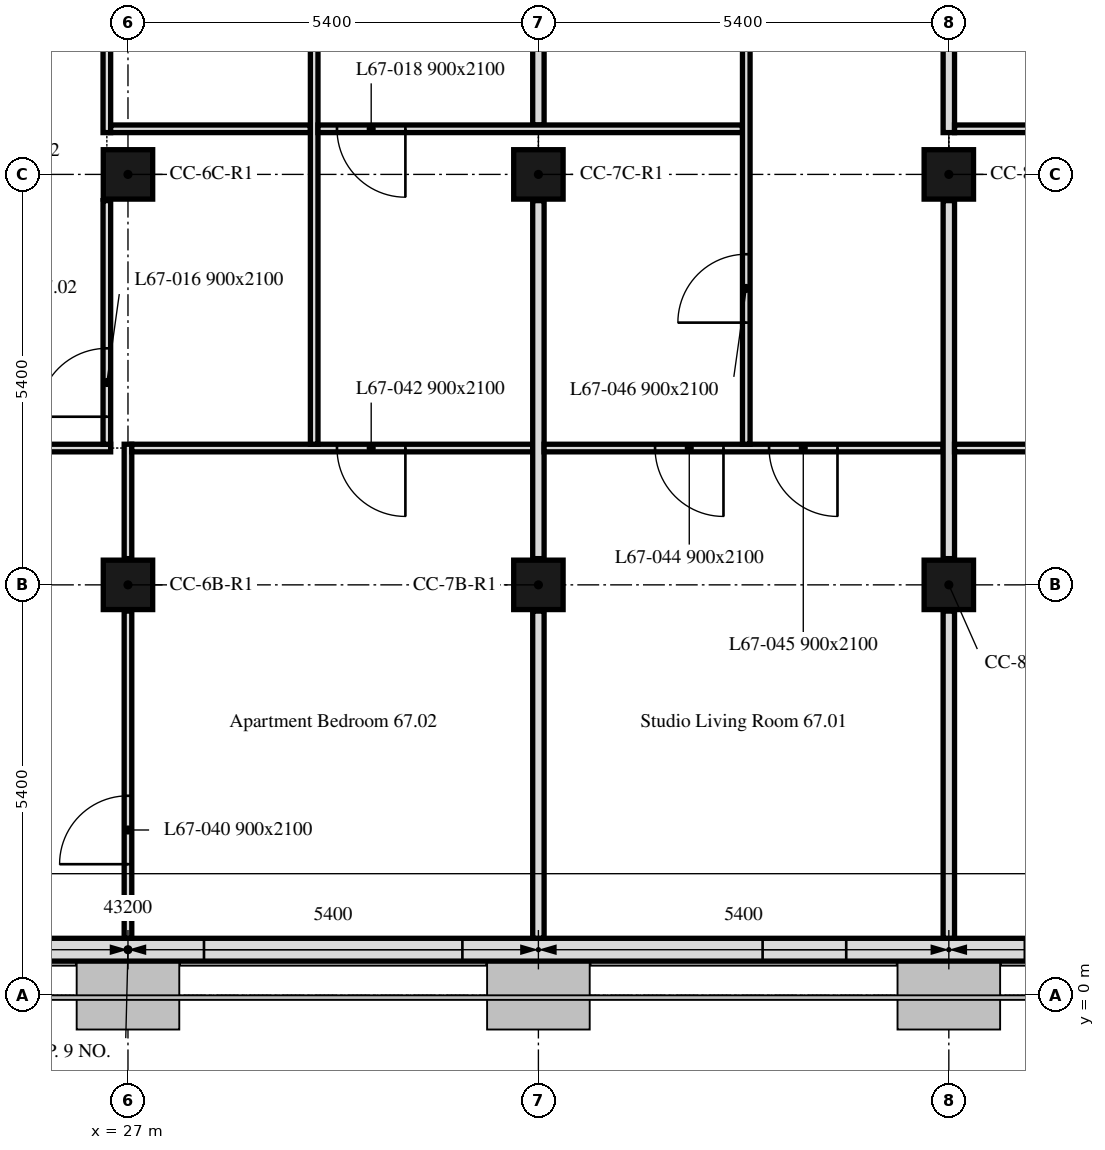
"""IFC4 building model, lengths in metres.
Left out: names, types, materials, properties, quantities, classifications, styles, units other than length and angle.
Written with IfcOpenShell. Run it as: python <this file> out.ifc"""

import sys

from ifc_helpers import new_model, si_unit, direction, frame, frame_2d, origin, origin_2d, place, context, subcontext, project, spatial, rectangle, extrude, element, fill, save


model = new_model("IFC4")
c1 = context("Model", 3, precision=1e-05, world=origin(), true_north=direction((0.0, 1.0)))
c2 = subcontext(c1, "Body", "Model", "MODEL_VIEW")
j1 = project(units=[si_unit("LENGTHUNIT", "METRE"), si_unit("PLANEANGLEUNIT", "RADIAN")], contexts=[c1])
p1 = place(None, origin())
s1 = spatial("IfcSite", under=j1, at=p1, CompositionType="ELEMENT")
p2 = place(p1, origin())
s2 = spatial("IfcBuilding", under=s1, at=p2, CompositionType="ELEMENT")
p3 = place(p2, frame((0.0, 0.0, 275.2)))
s3 = spatial("IfcBuildingStorey", under=s2, at=p3, CompositionType="ELEMENT", Elevation=275.2)
for number, where, z_axis, x_axis in (
    (1, (27.0, 5.4, 0.0), (0.0, 0.0, 1.0), (1.0, 0.0, 0.0)),
    (2, (32.4, 5.4, 0.0), (0.0, 0.0, 1.0), (1.0, 0.0, 0.0)),
    (3, (37.8, 5.4, 0.0), (0.0, 0.0, 1.0), (1.0, 0.0, 0.0)),
    (4, (27.0, 10.8, 0.0), (0.0, 0.0, 1.0), (1.0, 0.0, 0.0)),
    (5, (32.4, 10.8, 0.0), (0.0, 0.0, 1.0), (1.0, 0.0, 0.0)),
    (6, (37.8, 10.8, 0.0), (0.0, 0.0, 1.0), (1.0, 0.0, 0.0)),
):
    element("IfcColumn", number, at=place(p3, frame(where, z_axis=z_axis, x_axis=x_axis)), inside=s3, PredefinedType="COLUMN", context=c2, shape_type="SweptSolid", body=[
        extrude(rectangle(XDim=0.65, YDim=0.65, at=origin_2d()), origin(), (0.0, 0.0, 1.0), 3.0),
    ])
p4 = place(p3, frame((10.986, 0.6, 0.0), z_axis=(0.0, 0.0, 1.0), x_axis=(1.0, 0.0, 0.0)))
e7 = element("IfcWall", 7, at=p4, inside=s3, PredefinedType="SOLIDWALL", context=c2, shape_type="SweptSolid", body=[
    extrude(rectangle(XDim=32.027, YDim=0.3, at=frame_2d((16.014, 0.0))), origin(), (0.0, 0.0, 1.0), 3.0),
])
p5 = place(p4, frame((2.764, 0.0, 0.9)))
e8 = element("IfcOpeningElement", 8, at=p5, cuts=e7, PredefinedType="OPENING", context=c2, shape_type="SweptSolid", body=[
    extrude(rectangle(XDim=1.1, YDim=1.7, at=frame_2d((0.55, 0.85))), frame((0.0, 0.16, 0.0), z_axis=(0.0, -1.0, 0.0), x_axis=(1.0, 0.0, 0.0)), (0.0, 0.0, 1.0), 0.32),
])
p6 = place(p4, frame((6.214, 0.0, 0.9)))
e9 = element("IfcOpeningElement", 9, at=p6, cuts=e7, PredefinedType="OPENING", context=c2, shape_type="SweptSolid", body=[
    extrude(rectangle(XDim=3.4, YDim=1.7, at=frame_2d((1.7, 0.85))), frame((0.0, 0.16, 0.0), z_axis=(0.0, -1.0, 0.0), x_axis=(1.0, 0.0, 0.0)), (0.0, 0.0, 1.0), 0.32),
])
p7 = place(p4, frame((13.564, 0.0, 0.9)))
e10 = element("IfcOpeningElement", 10, at=p7, cuts=e7, PredefinedType="OPENING", context=c2, shape_type="SweptSolid", body=[
    extrude(rectangle(XDim=1.1, YDim=1.7, at=frame_2d((0.55, 0.85))), frame((0.0, 0.16, 0.0), z_axis=(0.0, -1.0, 0.0), x_axis=(1.0, 0.0, 0.0)), (0.0, 0.0, 1.0), 0.32),
])
p8 = place(p4, frame((17.014, 0.0, 0.9)))
e11 = element("IfcOpeningElement", 11, at=p8, cuts=e7, PredefinedType="OPENING", context=c2, shape_type="SweptSolid", body=[
    extrude(rectangle(XDim=3.4, YDim=1.7, at=frame_2d((1.7, 0.85))), frame((0.0, 0.16, 0.0), z_axis=(0.0, -1.0, 0.0), x_axis=(1.0, 0.0, 0.0)), (0.0, 0.0, 1.0), 0.32),
])
p9 = place(p4, frame((24.364, 0.0, 0.9)))
e12 = element("IfcOpeningElement", 12, at=p9, cuts=e7, PredefinedType="OPENING", context=c2, shape_type="SweptSolid", body=[
    extrude(rectangle(XDim=1.1, YDim=1.7, at=frame_2d((0.55, 0.85))), frame((0.0, 0.16, 0.0), z_axis=(0.0, -1.0, 0.0), x_axis=(1.0, 0.0, 0.0)), (0.0, 0.0, 1.0), 0.32),
])
p10 = place(p4, frame((27.814, 0.0, 0.9)))
e13 = element("IfcOpeningElement", 13, at=p10, cuts=e7, PredefinedType="OPENING", context=c2, shape_type="SweptSolid", body=[
    extrude(rectangle(XDim=3.4, YDim=1.7, at=frame_2d((1.7, 0.85))), frame((0.0, 0.16, 0.0), z_axis=(0.0, -1.0, 0.0), x_axis=(1.0, 0.0, 0.0)), (0.0, 0.0, 1.0), 0.32),
])
p11 = place(p3, frame((27.0, 0.751, 0.0), z_axis=(0.0, 0.0, 1.0), x_axis=(0.0, 1.0, 0.0)))
e14 = element("IfcWall", 14, at=p11, inside=s3, PredefinedType="PARTITIONING", context=c2, shape_type="SweptSolid", body=[
    extrude(rectangle(XDim=4.304, YDim=0.1, at=frame_2d((2.152, 0.0))), origin(), (0.0, 0.0, 1.0), 2.4),
])
p12 = place(p11, frame((0.974, 0.0, 0.0)))
e15 = element("IfcOpeningElement", 15, at=p12, cuts=e14, PredefinedType="OPENING", context=c2, shape_type="SweptSolid", body=[
    extrude(rectangle(XDim=0.9, YDim=2.1, at=frame_2d((0.45, 1.05))), frame((0.0, 0.05, 0.0), z_axis=(0.0, -1.0, 0.0), x_axis=(1.0, 0.0, 0.0)), (0.0, 0.0, 1.0), 0.1),
])
p13 = place(p3, frame((27.0, 5.745, 0.0), z_axis=(0.0, 0.0, 1.0), x_axis=(0.0, 1.0, 0.0)))
e16 = element("IfcWall", 16, at=p13, inside=s3, PredefinedType="PARTITIONING", context=c2, shape_type="SweptSolid", body=[
    extrude(rectangle(XDim=1.505, YDim=0.1, at=frame_2d((0.752, 0.0))), origin(), (0.0, 0.0, 1.0), 2.4),
])
p14 = place(p3, frame((26.772, 7.2, 0.0), z_axis=(0.0, 0.0, 1.0), x_axis=(-1.0, 0.0, 0.0)))
e17 = element("IfcWall", 17, at=p14, inside=s3, PredefinedType="PARTITIONING", context=c2, shape_type="SweptSolid", body=[
    extrude(rectangle(XDim=5.097, YDim=0.1, at=frame_2d((2.548, 0.0))), origin(), (0.0, 0.0, 1.0), 3.0),
])
p15 = place(p14, frame((3.801, 0.0, 0.0)))
e18 = element("IfcOpeningElement", 18, at=p15, cuts=e17, PredefinedType="OPENING", context=c2, shape_type="SweptSolid", body=[
    extrude(rectangle(XDim=0.9, YDim=2.1, at=frame_2d((0.45, 1.05))), frame((0.0, 0.05, 0.0), z_axis=(0.0, -1.0, 0.0), x_axis=(1.0, 0.0, 0.0)), (0.0, 0.0, 1.0), 0.1),
])
p16 = place(p14, frame((1.732, 0.0, 0.0)))
e19 = element("IfcOpeningElement", 19, at=p16, cuts=e17, PredefinedType="OPENING", context=c2, shape_type="SweptSolid", body=[
    extrude(rectangle(XDim=0.9, YDim=2.1, at=frame_2d((0.45, 1.05))), frame((0.0, 0.05, 0.0), z_axis=(0.0, -1.0, 0.0), x_axis=(1.0, 0.0, 0.0)), (0.0, 0.0, 1.0), 0.1),
])
p17 = place(p3, frame((32.4, 0.751, 0.0), z_axis=(0.0, 0.0, 1.0), x_axis=(0.0, 1.0, 0.0)))
e20 = element("IfcWall", 20, at=p17, inside=s3, PredefinedType="PARTITIONING", context=c2, shape_type="SweptSolid", body=[
    extrude(rectangle(XDim=4.304, YDim=0.15, at=frame_2d((2.152, 0.0))), origin(), (0.0, 0.0, 1.0), 2.4),
])
p18 = place(p3, frame((32.325, 7.2, 0.0), z_axis=(0.0, 0.0, 1.0), x_axis=(-1.0, 0.0, 0.0)))
e21 = element("IfcWall", 21, at=p18, inside=s3, PredefinedType="PARTITIONING", context=c2, shape_type="SweptSolid", body=[
    extrude(rectangle(XDim=5.275, YDim=0.1, at=frame_2d((2.637, 0.0))), origin(), (0.0, 0.0, 1.0), 3.0),
])
p19 = place(p18, frame((1.675, 0.0, 0.0)))
e22 = element("IfcOpeningElement", 22, at=p19, cuts=e21, PredefinedType="OPENING", context=c2, shape_type="SweptSolid", body=[
    extrude(rectangle(XDim=0.9, YDim=2.1, at=frame_2d((0.45, 1.05))), frame((0.0, 0.05, 0.0), z_axis=(0.0, -1.0, 0.0), x_axis=(1.0, 0.0, 0.0)), (0.0, 0.0, 1.0), 0.1),
])
p20 = place(p3, frame((26.722, 7.25, 0.0), z_axis=(0.0, 0.0, 1.0), x_axis=(0.0, 1.0, 0.0)))
e23 = element("IfcWall", 23, at=p20, inside=s3, PredefinedType="PARTITIONING", context=c2, shape_type="SweptSolid", body=[
    extrude(rectangle(XDim=3.205, YDim=0.1, at=frame_2d((1.603, 0.0))), origin(), (0.0, 0.0, 1.0), 3.0),
])
p21 = place(p20, frame((0.362, 0.0, 0.0)))
e24 = element("IfcOpeningElement", 24, at=p21, cuts=e23, PredefinedType="OPENING", context=c2, shape_type="SweptSolid", body=[
    extrude(rectangle(XDim=0.9, YDim=2.1, at=frame_2d((0.45, 1.05))), frame((0.0, 0.05, 0.0), z_axis=(0.0, -1.0, 0.0), x_axis=(1.0, 0.0, 0.0)), (0.0, 0.0, 1.0), 0.1),
])
p22 = place(p3, frame((26.722, 11.35, 0.0), z_axis=(0.0, 0.0, 1.0), x_axis=(0.0, 1.0, 0.0)))
e25 = element("IfcWall", 25, at=p22, inside=s3, PredefinedType="PARTITIONING", context=c2, shape_type="SweptSolid", body=[
    extrude(rectangle(XDim=2.975, YDim=0.1, at=frame_2d((1.487, 0.0))), origin(), (0.0, 0.0, 1.0), 3.0),
])
p23 = place(p22, frame((1.825, 0.0, 0.0)))
e26 = element("IfcOpeningElement", 26, at=p23, cuts=e25, PredefinedType="OPENING", context=c2, shape_type="SweptSolid", body=[
    extrude(rectangle(XDim=0.9, YDim=2.1, at=frame_2d((0.45, 1.05))), frame((0.0, 0.05, 0.0), z_axis=(0.0, -1.0, 0.0), x_axis=(1.0, 0.0, 0.0)), (0.0, 0.0, 1.0), 0.1),
])
p24 = place(p3, frame((29.4, 11.4, 0.0), z_axis=(0.0, 0.0, 1.0), x_axis=(-1.0, 0.0, 0.0)))
e27 = element("IfcWall", 27, at=p24, inside=s3, PredefinedType="PARTITIONING", context=c2, shape_type="SweptSolid", body=[
    extrude(rectangle(XDim=2.628, YDim=0.1, at=frame_2d((1.314, 0.0))), origin(), (0.0, 0.0, 1.0), 2.4),
])
p25 = place(p3, frame((29.45, 7.25, 0.0), z_axis=(0.0, 0.0, 1.0), x_axis=(0.0, 1.0, 0.0)))
e28 = element("IfcWall", 28, at=p25, inside=s3, PredefinedType="PARTITIONING", context=c2, shape_type="SweptSolid", body=[
    extrude(rectangle(XDim=7.075, YDim=0.1, at=frame_2d((3.538, 0.0))), origin(), (0.0, 0.0, 1.0), 3.0),
])
p26 = place(p3, frame((32.4, 5.745, 0.0), z_axis=(0.0, 0.0, 1.0), x_axis=(0.0, 1.0, 0.0)))
e29 = element("IfcWall", 29, at=p26, inside=s3, PredefinedType="PARTITIONING", context=c2, shape_type="SweptSolid", body=[
    extrude(rectangle(XDim=4.71, YDim=0.15, at=frame_2d((2.355, 0.0))), origin(), (0.0, 0.0, 1.0), 2.4),
])
p27 = place(p3, frame((32.4, 11.45, 0.0), z_axis=(0.0, 0.0, 1.0), x_axis=(0.0, 1.0, 0.0)))
e30 = element("IfcWall", 30, at=p27, inside=s3, PredefinedType="PARTITIONING", context=c2, shape_type="SweptSolid", body=[
    extrude(rectangle(XDim=2.875, YDim=0.15, at=frame_2d((1.438, 0.0))), origin(), (0.0, 0.0, 1.0), 2.4),
])
p28 = place(p3, frame((37.8, 0.751, 0.0), z_axis=(0.0, 0.0, 1.0), x_axis=(0.0, 1.0, 0.0)))
e31 = element("IfcWall", 31, at=p28, inside=s3, PredefinedType="PARTITIONING", context=c2, shape_type="SweptSolid", body=[
    extrude(rectangle(XDim=4.304, YDim=0.15, at=frame_2d((2.152, 0.0))), origin(), (0.0, 0.0, 1.0), 2.4),
])
p29 = place(p3, frame((37.725, 7.2, 0.0), z_axis=(0.0, 0.0, 1.0), x_axis=(-1.0, 0.0, 0.0)))
e32 = element("IfcWall", 32, at=p29, inside=s3, PredefinedType="PARTITIONING", context=c2, shape_type="SweptSolid", body=[
    extrude(rectangle(XDim=5.25, YDim=0.1, at=frame_2d((2.625, 0.0))), origin(), (0.0, 0.0, 1.0), 3.0),
])
p30 = place(p29, frame((2.89, 0.0, 0.0)))
e33 = element("IfcOpeningElement", 33, at=p30, cuts=e32, PredefinedType="OPENING", context=c2, shape_type="SweptSolid", body=[
    extrude(rectangle(XDim=0.9, YDim=2.1, at=frame_2d((0.45, 1.05))), frame((0.0, 0.05, 0.0), z_axis=(0.0, -1.0, 0.0), x_axis=(1.0, 0.0, 0.0)), (0.0, 0.0, 1.0), 0.1),
])
p31 = place(p29, frame((1.39, 0.0, 0.0)))
e34 = element("IfcOpeningElement", 34, at=p31, cuts=e32, PredefinedType="OPENING", context=c2, shape_type="SweptSolid", body=[
    extrude(rectangle(XDim=0.9, YDim=2.1, at=frame_2d((0.45, 1.05))), frame((0.0, 0.05, 0.0), z_axis=(0.0, -1.0, 0.0), x_axis=(1.0, 0.0, 0.0)), (0.0, 0.0, 1.0), 0.1),
])
p32 = place(p3, frame((35.085, 11.4, 0.0), z_axis=(0.0, 0.0, 1.0), x_axis=(-1.0, 0.0, 0.0)))
e35 = element("IfcWall", 35, at=p32, inside=s3, PredefinedType="PARTITIONING", context=c2, shape_type="SweptSolid", body=[
    extrude(rectangle(XDim=5.585, YDim=0.1, at=frame_2d((2.792, 0.0))), origin(), (0.0, 0.0, 1.0), 2.4),
])
p33 = place(p32, frame((4.435, 0.0, 0.0)))
e36 = element("IfcOpeningElement", 36, at=p33, cuts=e35, PredefinedType="OPENING", context=c2, shape_type="SweptSolid", body=[
    extrude(rectangle(XDim=0.9, YDim=2.1, at=frame_2d((0.45, 1.05))), frame((0.0, 0.05, 0.0), z_axis=(0.0, -1.0, 0.0), x_axis=(1.0, 0.0, 0.0)), (0.0, 0.0, 1.0), 0.1),
])
p34 = place(p3, frame((35.135, 7.25, 0.0), z_axis=(0.0, 0.0, 1.0), x_axis=(0.0, 1.0, 0.0)))
e37 = element("IfcWall", 37, at=p34, inside=s3, PredefinedType="PARTITIONING", context=c2, shape_type="SweptSolid", body=[
    extrude(rectangle(XDim=7.075, YDim=0.1, at=frame_2d((3.538, 0.0))), origin(), (0.0, 0.0, 1.0), 2.4),
])
p35 = place(p34, frame((5.45, 0.0, 0.0)))
e38 = element("IfcOpeningElement", 38, at=p35, cuts=e37, PredefinedType="OPENING", context=c2, shape_type="SweptSolid", body=[
    extrude(rectangle(XDim=0.9, YDim=2.1, at=frame_2d((0.45, 1.05))), frame((0.0, 0.05, 0.0), z_axis=(0.0, -1.0, 0.0), x_axis=(1.0, 0.0, 0.0)), (0.0, 0.0, 1.0), 0.1),
])
p36 = place(p34, frame((1.6, 0.0, 0.0)))
e39 = element("IfcOpeningElement", 39, at=p36, cuts=e37, PredefinedType="OPENING", context=c2, shape_type="SweptSolid", body=[
    extrude(rectangle(XDim=0.9, YDim=2.1, at=frame_2d((0.45, 1.05))), frame((0.0, 0.05, 0.0), z_axis=(0.0, -1.0, 0.0), x_axis=(1.0, 0.0, 0.0)), (0.0, 0.0, 1.0), 0.1),
])
p37 = place(p3, frame((37.8, 5.745, 0.0), z_axis=(0.0, 0.0, 1.0), x_axis=(0.0, 1.0, 0.0)))
e40 = element("IfcWall", 40, at=p37, inside=s3, PredefinedType="PARTITIONING", context=c2, shape_type="SweptSolid", body=[
    extrude(rectangle(XDim=4.71, YDim=0.15, at=frame_2d((2.355, 0.0))), origin(), (0.0, 0.0, 1.0), 2.4),
])
p38 = place(p3, frame((37.8, 11.35, 0.0), z_axis=(0.0, 0.0, 1.0), x_axis=(0.0, 1.0, 0.0)))
e41 = element("IfcWall", 41, at=p38, inside=s3, PredefinedType="PARTITIONING", context=c2, shape_type="SweptSolid", body=[
    extrude(rectangle(XDim=2.975, YDim=0.15, at=frame_2d((1.487, 0.0))), origin(), (0.0, 0.0, 1.0), 2.4),
])
p39 = place(p3, frame((47.849, 7.2, 0.0), z_axis=(0.0, 0.0, 1.0), x_axis=(-1.0, 0.0, 0.0)))
e42 = element("IfcWall", 42, at=p39, inside=s3, PredefinedType="PARTITIONING", context=c2, shape_type="SweptSolid", body=[
    extrude(rectangle(XDim=9.974, YDim=0.1, at=frame_2d((4.987, 0.0))), origin(), (0.0, 0.0, 1.0), 3.0),
])
p40 = place(p39, frame((7.555, 0.0, 0.0)))
e43 = element("IfcOpeningElement", 43, at=p40, cuts=e42, PredefinedType="OPENING", context=c2, shape_type="SweptSolid", body=[
    extrude(rectangle(XDim=0.9, YDim=2.1, at=frame_2d((0.45, 1.05))), frame((0.0, 0.05, 0.0), z_axis=(0.0, -1.0, 0.0), x_axis=(1.0, 0.0, 0.0)), (0.0, 0.0, 1.0), 0.1),
])
p41 = place(p39, frame((5.502, 0.0, 0.0)))
e44 = element("IfcOpeningElement", 44, at=p41, cuts=e42, PredefinedType="OPENING", context=c2, shape_type="SweptSolid", body=[
    extrude(rectangle(XDim=0.9, YDim=2.1, at=frame_2d((0.45, 1.05))), frame((0.0, 0.05, 0.0), z_axis=(0.0, -1.0, 0.0), x_axis=(1.0, 0.0, 0.0)), (0.0, 0.0, 1.0), 0.1),
])
p42 = place(p39, frame((0.25, 0.0, 0.0)))
e45 = element("IfcOpeningElement", 45, at=p42, cuts=e42, PredefinedType="OPENING", context=c2, shape_type="SweptSolid", body=[
    extrude(rectangle(XDim=0.8, YDim=2.1, at=frame_2d((0.4, 1.05))), frame((0.0, 0.05, 0.0), z_axis=(0.0, -1.0, 0.0), x_axis=(1.0, 0.0, 0.0)), (0.0, 0.0, 1.0), 0.1),
])
p43 = place(p3, frame((40.544, 11.4, 0.0), z_axis=(0.0, 0.0, 1.0), x_axis=(-1.0, 0.0, 0.0)))
e46 = element("IfcWall", 46, at=p43, inside=s3, PredefinedType="PARTITIONING", context=c2, shape_type="SweptSolid", body=[
    extrude(rectangle(XDim=2.669, YDim=0.1, at=frame_2d((1.334, 0.0))), origin(), (0.0, 0.0, 1.0), 3.0),
])
p44 = place(p8, origin())
e47 = element("IfcWindow", 47, at=p44, inside=s3, PartitioningType="SINGLE_PANEL", PredefinedType="WINDOW", context=c2, shape_type="SweptSolid", body=[
    extrude(rectangle(XDim=3.4, YDim=1.7, at=frame_2d((1.7, 0.85))), frame((0.0, 0.03, 0.0), z_axis=(0.0, -1.0, 0.0), x_axis=(1.0, 0.0, 0.0)), (0.0, 0.0, 1.0), 0.06),
])
fill(e11, e47)
p45 = place(p9, origin())
e48 = element("IfcWindow", 48, at=p45, inside=s3, PartitioningType="SINGLE_PANEL", PredefinedType="WINDOW", context=c2, shape_type="SweptSolid", body=[
    extrude(rectangle(XDim=1.1, YDim=1.7, at=frame_2d((0.55, 0.85))), frame((0.0, 0.03, 0.0), z_axis=(0.0, -1.0, 0.0), x_axis=(1.0, 0.0, 0.0)), (0.0, 0.0, 1.0), 0.06),
])
fill(e12, e48)
p46 = place(p21, origin())
e49 = element("IfcDoor", 49, at=p46, inside=s3, OperationType="SINGLE_SWING_RIGHT", PredefinedType="DOOR", context=c2, shape_type="SweptSolid", body=[
    extrude(rectangle(XDim=0.9, YDim=2.1, at=frame_2d((0.45, 1.05))), frame((0.0, 0.025, 0.0), z_axis=(0.0, -1.0, 0.0), x_axis=(1.0, 0.0, 0.0)), (0.0, 0.0, 1.0), 0.05),
])
fill(e24, e49)
p47 = place(p33, origin())
e50 = element("IfcDoor", 50, at=p47, inside=s3, OperationType="SINGLE_SWING_RIGHT", PredefinedType="DOOR", context=c2, shape_type="SweptSolid", body=[
    extrude(rectangle(XDim=0.9, YDim=2.1, at=frame_2d((0.45, 1.05))), frame((0.0, 0.025, 0.0), z_axis=(0.0, -1.0, 0.0), x_axis=(1.0, 0.0, 0.0)), (0.0, 0.0, 1.0), 0.05),
])
fill(e36, e50)
p48 = place(p12, origin())
e51 = element("IfcDoor", 51, at=p48, inside=s3, OperationType="SINGLE_SWING_RIGHT", PredefinedType="DOOR", context=c2, shape_type="SweptSolid", body=[
    extrude(rectangle(XDim=0.9, YDim=2.1, at=frame_2d((0.45, 1.05))), frame((0.0, 0.025, 0.0), z_axis=(0.0, -1.0, 0.0), x_axis=(1.0, 0.0, 0.0)), (0.0, 0.0, 1.0), 0.05),
])
fill(e15, e51)
p49 = place(p19, origin())
e52 = element("IfcDoor", 52, at=p49, inside=s3, OperationType="SINGLE_SWING_RIGHT", PredefinedType="DOOR", context=c2, shape_type="SweptSolid", body=[
    extrude(rectangle(XDim=0.9, YDim=2.1, at=frame_2d((0.45, 1.05))), frame((0.0, 0.025, 0.0), z_axis=(0.0, -1.0, 0.0), x_axis=(1.0, 0.0, 0.0)), (0.0, 0.0, 1.0), 0.05),
])
fill(e22, e52)
p50 = place(p30, origin())
e53 = element("IfcDoor", 53, at=p50, inside=s3, OperationType="SINGLE_SWING_LEFT", PredefinedType="DOOR", context=c2, shape_type="SweptSolid", body=[
    extrude(rectangle(XDim=0.9, YDim=2.1, at=frame_2d((0.45, 1.05))), frame((0.0, 0.025, 0.0), z_axis=(0.0, -1.0, 0.0), x_axis=(1.0, 0.0, 0.0)), (0.0, 0.0, 1.0), 0.05),
])
fill(e33, e53)
p51 = place(p31, origin())
e54 = element("IfcDoor", 54, at=p51, inside=s3, OperationType="SINGLE_SWING_RIGHT", PredefinedType="DOOR", context=c2, shape_type="SweptSolid", body=[
    extrude(rectangle(XDim=0.9, YDim=2.1, at=frame_2d((0.45, 1.05))), frame((0.0, 0.025, 0.0), z_axis=(0.0, -1.0, 0.0), x_axis=(1.0, 0.0, 0.0)), (0.0, 0.0, 1.0), 0.05),
])
fill(e34, e54)
p52 = place(p36, origin())
e55 = element("IfcDoor", 55, at=p52, inside=s3, OperationType="SINGLE_SWING_LEFT", PredefinedType="DOOR", context=c2, shape_type="SweptSolid", body=[
    extrude(rectangle(XDim=0.9, YDim=2.1, at=frame_2d((0.45, 1.05))), frame((0.0, 0.025, 0.0), z_axis=(0.0, -1.0, 0.0), x_axis=(1.0, 0.0, 0.0)), (0.0, 0.0, 1.0), 0.05),
])
fill(e39, e55)
save(model, sys.argv[1])
